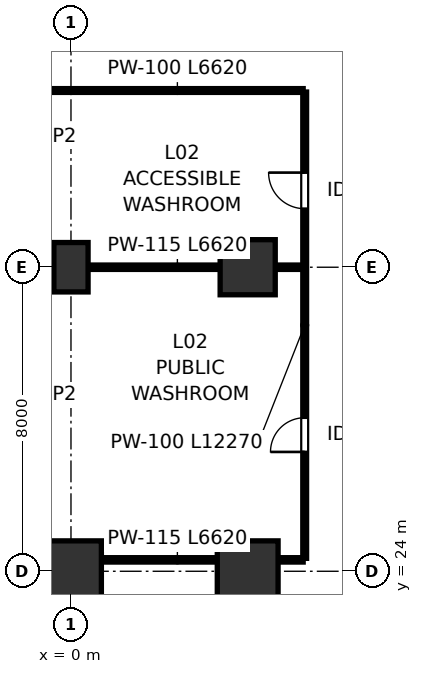
"""IFC4 building model, lengths in metres.
Left out: names, types, materials, properties, quantities, classifications, styles, units other than length and angle.
Written with IfcOpenShell. Run it as: python <this file> out.ifc"""

import sys

from ifc_helpers import new_model, si_unit, direction, frame, frame_2d, origin, origin_2d, place, context, subcontext, project, spatial, rectangle, extrude, source, transform, mapped, element, fill, save


model = new_model("IFC4")
c1 = context("Model", 3, precision=1e-05, world=origin(), true_north=direction((0.0, 1.0)))
c2 = subcontext(c1, "Body", "Model", "MODEL_VIEW")
j1 = project(units=[si_unit("LENGTHUNIT", "METRE"), si_unit("PLANEANGLEUNIT", "RADIAN")], contexts=[c1])
p1 = place(None, origin())
s1 = spatial("IfcSite", under=j1, at=p1, CompositionType="ELEMENT")
p2 = place(p1, origin())
s2 = spatial("IfcBuilding", under=s1, at=p2, CompositionType="ELEMENT")
p3 = place(p2, frame((0.0, 0.0, 6.0)))
s3 = spatial("IfcBuildingStorey", under=s2, at=p3, CompositionType="ELEMENT", Elevation=6.0)
m1 = source(origin(), c2, "Body", "SweptSolid", [
    extrude(rectangle(XDim=1.6, YDim=1.6, at=origin_2d()), origin(), (0.0, 0.0, 1.0), 5.999),
])
p4 = place(p3, frame((0.0, 24.0, 0.001), z_axis=(0.0, 0.0, 1.0), x_axis=(1.0, 0.0, 0.0)))
e1 = element("IfcColumn", 1, at=p4, inside=s3, PredefinedType="COLUMN", context=c2, shape_type="MappedRepresentation", body=[
    mapped(m1, transform((0.0, 0.0, 0.0), scale=1.0)),
])
m2 = source(origin(), c2, "Body", "SweptSolid", [
    extrude(rectangle(XDim=0.9, YDim=1.3, at=origin_2d()), origin(), (0.0, 0.0, 1.0), 5.999),
])
p5 = place(p3, frame((0.0, 32.0, 0.001), z_axis=(0.0, 0.0, 1.0), x_axis=(1.0, 0.0, 0.0)))
e2 = element("IfcColumn", 2, at=p5, inside=s3, PredefinedType="PILASTER", context=c2, shape_type="MappedRepresentation", body=[
    mapped(m2, transform((0.0, 0.0, 0.0), scale=1.0)),
])
p6 = place(p3, frame((4.65, 24.0, 0.001), z_axis=(0.0, 0.0, 1.0), x_axis=(1.0, 0.0, 0.0)))
e3 = element("IfcColumn", 3, at=p6, inside=s3, PredefinedType="COLUMN", context=c2, shape_type="MappedRepresentation", body=[
    mapped(m1, transform((0.0, 0.0, 0.0), scale=1.0)),
])
m3 = source(origin(), c2, "Body", "SweptSolid", [
    extrude(rectangle(XDim=1.45, YDim=1.45, at=origin_2d()), origin(), (0.0, 0.0, 1.0), 5.999),
])
p7 = place(p3, frame((4.65, 32.0, 0.001), z_axis=(0.0, 0.0, 1.0), x_axis=(1.0, 0.0, 0.0)))
e4 = element("IfcColumn", 4, at=p7, inside=s3, PredefinedType="COLUMN", context=c2, shape_type="MappedRepresentation", body=[
    mapped(m3, transform((0.0, 0.0, 0.0), scale=1.0)),
])
p8 = place(p3, frame((-0.51, 24.3, 0.0), z_axis=(0.0, 0.0, 1.0), x_axis=(1.0, 0.0, 0.0)))
e5 = element("IfcWall", 5, at=p8, inside=s3, PredefinedType="PARTITIONING", context=c2, shape_type="SweptSolid", body=[
    extrude(rectangle(XDim=6.62, YDim=0.115, at=frame_2d((3.31, 0.0))), origin(), (0.0, 0.0, 1.0), 4.869),
])
p9 = place(p3, frame((-0.51, 36.65, 0.0), z_axis=(0.0, 0.0, 1.0), x_axis=(1.0, 0.0, 0.0)))
e6 = element("IfcWall", 6, at=p9, inside=s3, PredefinedType="PARTITIONING", context=c2, shape_type="SweptSolid", body=[
    extrude(rectangle(XDim=6.62, YDim=0.1, at=frame_2d((3.31, 0.0))), origin(), (0.0, 0.0, 1.0), 4.875),
])
p10 = place(p3, frame((-0.51, 32.0, 0.0), z_axis=(0.0, 0.0, 1.0), x_axis=(1.0, 0.0, 0.0)))
e7 = element("IfcWall", 7, at=p10, inside=s3, PredefinedType="PARTITIONING", context=c2, shape_type="SweptSolid", body=[
    extrude(rectangle(XDim=6.62, YDim=0.115, at=frame_2d((3.31, 0.0))), origin(), (0.0, 0.0, 1.0), 4.875),
])
p11 = place(p3, frame((6.15, 24.34, 0.0), z_axis=(0.0, 0.0, 1.0), x_axis=(0.0, 1.0, 0.0)))
e8 = element("IfcWall", 8, at=p11, inside=s3, PredefinedType="PARTITIONING", context=c2, shape_type="SweptSolid", body=[
    extrude(rectangle(XDim=12.27, YDim=0.1, at=frame_2d((6.135, 0.0))), origin(), (0.0, 0.0, 1.0), 4.875),
])
p12 = place(p11, frame((2.8, 0.0, 0.0)))
e9 = element("IfcOpeningElement", 9, at=p12, cuts=e8, PredefinedType="OPENING", context=c2, shape_type="SweptSolid", body=[
    extrude(rectangle(XDim=0.9, YDim=2.15, at=frame_2d((0.45, 1.075))), frame((0.0, 0.06, 0.0), z_axis=(0.0, -1.0, 0.0), x_axis=(1.0, 0.0, 0.0)), (0.0, 0.0, 1.0), 0.12),
])
p13 = place(p11, frame((9.2, 0.0, 0.0)))
e10 = element("IfcOpeningElement", 10, at=p13, cuts=e8, PredefinedType="OPENING", context=c2, shape_type="SweptSolid", body=[
    extrude(rectangle(XDim=0.95, YDim=2.15, at=frame_2d((0.475, 1.075))), frame((0.0, 0.06, 0.0), z_axis=(0.0, -1.0, 0.0), x_axis=(1.0, 0.0, 0.0)), (0.0, 0.0, 1.0), 0.12),
])
m4 = source(origin(), c2, "Body", "SweptSolid", [
    extrude(rectangle(XDim=0.9, YDim=2.15, at=frame_2d((0.45, 1.075))), frame((0.0, 0.025, 0.0), z_axis=(0.0, -1.0, 0.0), x_axis=(1.0, 0.0, 0.0)), (0.0, 0.0, 1.0), 0.05),
])
p14 = place(p12, origin())
e11 = element("IfcDoor", 11, at=p14, inside=s3, OperationType="SINGLE_SWING_LEFT", PredefinedType="DOOR", context=c2, shape_type="MappedRepresentation", body=[
    mapped(m4, transform((0.0, 0.0, 0.0), scale=1.0)),
])
fill(e9, e11)
m5 = source(origin(), c2, "Body", "SweptSolid", [
    extrude(rectangle(XDim=0.95, YDim=2.15, at=frame_2d((0.475, 1.075))), frame((0.0, 0.025, 0.0), z_axis=(0.0, -1.0, 0.0), x_axis=(1.0, 0.0, 0.0)), (0.0, 0.0, 1.0), 0.05),
])
p15 = place(p13, origin())
e12 = element("IfcDoor", 12, at=p15, inside=s3, OperationType="SINGLE_SWING_RIGHT", PredefinedType="DOOR", context=c2, shape_type="MappedRepresentation", body=[
    mapped(m5, transform((0.0, 0.0, 0.0), scale=1.0)),
])
fill(e10, e12)
save(model, sys.argv[1])
